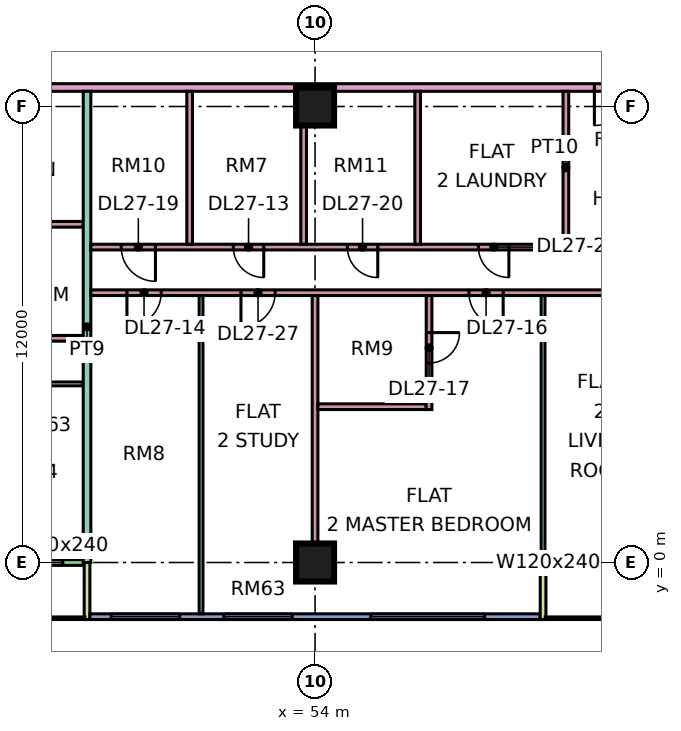
"""IFC4 building model, lengths in metres.
Left out: names, types, materials, properties, quantities, classifications, styles, units other than length and angle.
Written with IfcOpenShell. Run it as: python <this file> out.ifc"""

import sys

from ifc_helpers import new_model, si_unit, direction, frame, frame_2d, origin, origin_2d, place, context, subcontext, project, spatial, rectangle, extrude, element, fill, save


model = new_model("IFC4")
c1 = context("Model", 3, precision=1e-05, world=origin(), true_north=direction((0.0, 1.0)))
c2 = subcontext(c1, "Body", "Model", "MODEL_VIEW")
j1 = project(units=[si_unit("LENGTHUNIT", "METRE"), si_unit("PLANEANGLEUNIT", "RADIAN")], contexts=[c1])
p1 = place(None, origin())
s1 = spatial("IfcSite", under=j1, at=p1, CompositionType="ELEMENT")
p2 = place(p1, origin())
s2 = spatial("IfcBuilding", under=s1, at=p2, CompositionType="ELEMENT")
p3 = place(p2, frame((0.0, 0.0, 118.15)))
s3 = spatial("IfcBuildingStorey", under=s2, at=p3, CompositionType="ELEMENT", Elevation=118.15)
for number, where, z_axis, x_axis in (
    (1, (54.0, 0.0, 0.0), (0.0, 0.0, 1.0), (1.0, 0.0, 0.0)),
    (2, (54.0, 12.0, 0.0), (0.0, 0.0, 1.0), (1.0, 0.0, 0.0)),
):
    element("IfcColumn", number, at=place(p3, frame(where, z_axis=z_axis, x_axis=x_axis)), inside=s3, PredefinedType="COLUMN", context=c2, shape_type="SweptSolid", body=[
        extrude(rectangle(XDim=1.0, YDim=1.0, at=origin_2d()), origin(), (0.0, 0.0, 1.0), 3.75),
    ])
p4 = place(p3, frame((36.075, 0.0, 0.0), z_axis=(0.0, 0.0, 1.0), x_axis=(1.0, 0.0, 0.0)))
e3 = element("IfcWall", 3, at=p4, inside=s3, PredefinedType="SOLIDWALL", context=c2, shape_type="SweptSolid", body=[
    extrude(rectangle(XDim=11.85, YDim=0.15, at=frame_2d((5.925, 0.0))), origin(), (0.0, 0.0, 1.0), 3.35),
])
p5 = place(p4, frame((3.525, 0.0, 0.0)))
e4 = element("IfcOpeningElement", 4, at=p5, cuts=e3, PredefinedType="OPENING", context=c2, shape_type="SweptSolid", body=[
    extrude(rectangle(XDim=1.8, YDim=2.4, at=frame_2d((0.9, 1.2))), frame((0.0, 0.085, 0.0), z_axis=(0.0, -1.0, 0.0), x_axis=(1.0, 0.0, 0.0)), (0.0, 0.0, 1.0), 0.17),
])
p6 = place(p4, frame((10.087, 0.0, 0.45)))
e5 = element("IfcOpeningElement", 5, at=p6, cuts=e3, PredefinedType="OPENING", context=c2, shape_type="SweptSolid", body=[
    extrude(rectangle(XDim=1.2, YDim=2.4, at=frame_2d((0.6, 1.2))), frame((0.0, 0.085, 0.0), z_axis=(0.0, -1.0, 0.0), x_axis=(1.0, 0.0, 0.0)), (0.0, 0.0, 1.0), 0.17),
])
p7 = place(p3, frame((48.0, -1.5, 0.0), z_axis=(0.0, 0.0, 1.0), x_axis=(0.0, 1.0, 0.0)))
e6 = element("IfcWall", 6, at=p7, inside=s3, PredefinedType="SOLIDWALL", context=c2, shape_type="SweptSolid", body=[
    extrude(rectangle(XDim=1.5, YDim=0.15, at=frame_2d((0.75, 0.0))), origin(), (0.0, 0.0, 1.0), 3.35),
])
p8 = place(p3, frame((48.075, -1.425, 0.0), z_axis=(0.0, 0.0, 1.0), x_axis=(1.0, 0.0, 0.0)))
e7 = element("IfcWall", 7, at=p8, inside=s3, PredefinedType="SOLIDWALL", context=c2, shape_type="SweptSolid", body=[
    extrude(rectangle(XDim=11.85, YDim=0.15, at=frame_2d((5.925, 0.0))), origin(), (0.0, 0.0, 1.0), 3.35),
])
p9 = place(p8, frame((0.562, 0.0, 0.45)))
e8 = element("IfcOpeningElement", 8, at=p9, cuts=e7, PredefinedType="OPENING", context=c2, shape_type="SweptSolid", body=[
    extrude(rectangle(XDim=1.8, YDim=2.4, at=frame_2d((0.9, 1.2))), frame((0.0, 0.085, 0.0), z_axis=(0.0, -1.0, 0.0), x_axis=(1.0, 0.0, 0.0)), (0.0, 0.0, 1.0), 0.17),
])
p10 = place(p8, frame((3.525, 0.0, 0.45)))
e9 = element("IfcOpeningElement", 9, at=p10, cuts=e7, PredefinedType="OPENING", context=c2, shape_type="SweptSolid", body=[
    extrude(rectangle(XDim=1.8, YDim=2.4, at=frame_2d((0.9, 1.2))), frame((0.0, 0.085, 0.0), z_axis=(0.0, -1.0, 0.0), x_axis=(1.0, 0.0, 0.0)), (0.0, 0.0, 1.0), 0.17),
])
p11 = place(p8, frame((7.387, 0.0, 0.45)))
e10 = element("IfcOpeningElement", 10, at=p11, cuts=e7, PredefinedType="OPENING", context=c2, shape_type="SweptSolid", body=[
    extrude(rectangle(XDim=3.0, YDim=2.4, at=frame_2d((1.5, 1.2))), frame((0.0, 0.085, 0.0), z_axis=(0.0, -1.0, 0.0), x_axis=(1.0, 0.0, 0.0)), (0.0, 0.0, 1.0), 0.17),
])
p12 = place(p3, frame((60.075, 0.0, 0.0), z_axis=(0.0, 0.0, 1.0), x_axis=(1.0, 0.0, 0.0)))
e11 = element("IfcWall", 11, at=p12, inside=s3, PredefinedType="SOLIDWALL", context=c2, shape_type="SweptSolid", body=[
    extrude(rectangle(XDim=10.35, YDim=0.15, at=frame_2d((5.175, 0.0))), origin(), (0.0, 0.0, 1.0), 3.35),
])
p13 = place(p12, frame((0.562, 0.0, 0.45)))
e12 = element("IfcOpeningElement", 12, at=p13, cuts=e11, PredefinedType="OPENING", context=c2, shape_type="SweptSolid", body=[
    extrude(rectangle(XDim=1.2, YDim=2.4, at=frame_2d((0.6, 1.2))), frame((0.0, 0.085, 0.0), z_axis=(0.0, -1.0, 0.0), x_axis=(1.0, 0.0, 0.0)), (0.0, 0.0, 1.0), 0.17),
])
p14 = place(p12, frame((4.125, 0.0, 0.0)))
e13 = element("IfcOpeningElement", 13, at=p14, cuts=e11, PredefinedType="OPENING", context=c2, shape_type="SweptSolid", body=[
    extrude(rectangle(XDim=1.2, YDim=2.4, at=frame_2d((0.6, 1.2))), frame((0.0, 0.085, 0.0), z_axis=(0.0, -1.0, 0.0), x_axis=(1.0, 0.0, 0.0)), (0.0, 0.0, 1.0), 0.17),
])
p15 = place(p12, frame((6.525, 0.0, 0.45)))
e14 = element("IfcOpeningElement", 14, at=p15, cuts=e11, PredefinedType="OPENING", context=c2, shape_type="SweptSolid", body=[
    extrude(rectangle(XDim=1.8, YDim=2.4, at=frame_2d((0.9, 1.2))), frame((0.0, 0.085, 0.0), z_axis=(0.0, -1.0, 0.0), x_axis=(1.0, 0.0, 0.0)), (0.0, 0.0, 1.0), 0.17),
])
p16 = place(p12, frame((9.188, 0.0, 0.45)))
e15 = element("IfcOpeningElement", 15, at=p16, cuts=e11, PredefinedType="OPENING", context=c2, shape_type="SweptSolid", body=[
    extrude(rectangle(XDim=0.9, YDim=2.4, at=frame_2d((0.45, 1.2))), frame((0.0, 0.085, 0.0), z_axis=(0.0, -1.0, 0.0), x_axis=(1.0, 0.0, 0.0)), (0.0, 0.0, 1.0), 0.17),
])
p17 = place(p3, frame((60.0, -1.5, 0.0), z_axis=(0.0, 0.0, 1.0), x_axis=(0.0, 1.0, 0.0)))
e16 = element("IfcWall", 16, at=p17, inside=s3, PredefinedType="SOLIDWALL", context=c2, shape_type="SweptSolid", body=[
    extrude(rectangle(XDim=1.5, YDim=0.15, at=frame_2d((0.75, 0.0))), origin(), (0.0, 0.0, 1.0), 3.35),
])
p18 = place(p3, frame((33.05, 4.7, 0.0), z_axis=(0.0, 0.0, 1.0), x_axis=(1.0, 0.0, 0.0)))
e17 = element("IfcWall", 17, at=p18, inside=s3, PredefinedType="PARTITIONING", context=c2, shape_type="SweptSolid", body=[
    extrude(rectangle(XDim=14.85, YDim=0.1, at=frame_2d((7.425, 0.0))), origin(), (0.0, 0.0, 1.0), 3.35),
])
p19 = place(p18, frame((1.0, 0.0, 0.0)))
e18 = element("IfcOpeningElement", 18, at=p19, cuts=e17, PredefinedType="OPENING", context=c2, shape_type="SweptSolid", body=[
    extrude(rectangle(XDim=0.9, YDim=2.1, at=frame_2d((0.45, 1.05))), frame((0.0, 0.06, 0.0), z_axis=(0.0, -1.0, 0.0), x_axis=(1.0, 0.0, 0.0)), (0.0, 0.0, 1.0), 0.12),
])
p20 = place(p18, frame((13.0, 0.0, 0.0)))
e19 = element("IfcOpeningElement", 19, at=p20, cuts=e17, PredefinedType="OPENING", context=c2, shape_type="SweptSolid", body=[
    extrude(rectangle(XDim=0.9, YDim=2.1, at=frame_2d((0.45, 1.05))), frame((0.0, 0.06, 0.0), z_axis=(0.0, -1.0, 0.0), x_axis=(1.0, 0.0, 0.0)), (0.0, 0.0, 1.0), 0.12),
])
p21 = place(p18, frame((7.0, 0.0, 0.0)))
e20 = element("IfcOpeningElement", 20, at=p21, cuts=e17, PredefinedType="OPENING", context=c2, shape_type="SweptSolid", body=[
    extrude(rectangle(XDim=0.9, YDim=2.1, at=frame_2d((0.45, 1.05))), frame((0.0, 0.06, 0.0), z_axis=(0.0, -1.0, 0.0), x_axis=(1.0, 0.0, 0.0)), (0.0, 0.0, 1.0), 0.12),
])
p22 = place(p3, frame((40.65, 12.5, 0.0), z_axis=(0.0, 0.0, 1.0), x_axis=(1.0, 0.0, 0.0)))
e21 = element("IfcWall", 21, at=p22, inside=s3, PredefinedType="PARTITIONING", context=c2, shape_type="SweptSolid", body=[
    extrude(rectangle(XDim=31.276, YDim=0.2, at=frame_2d((15.638, 0.0))), origin(), (0.0, 0.0, 1.0), 3.35),
])
p23 = place(p22, frame((20.7, 0.0, 0.0)))
e22 = element("IfcOpeningElement", 22, at=p23, cuts=e21, PredefinedType="OPENING", context=c2, shape_type="SweptSolid", body=[
    extrude(rectangle(XDim=1.0, YDim=2.1, at=frame_2d((0.5, 1.05))), frame((0.0, 0.11, 0.0), z_axis=(0.0, -1.0, 0.0), x_axis=(1.0, 0.0, 0.0)), (0.0, 0.0, 1.0), 0.22),
])
p24 = place(p22, frame((1.05, 0.0, 0.0)))
e23 = element("IfcOpeningElement", 23, at=p24, cuts=e21, PredefinedType="OPENING", context=c2, shape_type="SweptSolid", body=[
    extrude(rectangle(XDim=1.0, YDim=2.1, at=frame_2d((0.5, 1.05))), frame((0.0, 0.11, 0.0), z_axis=(0.0, -1.0, 0.0), x_axis=(1.0, 0.0, 0.0)), (0.0, 0.0, 1.0), 0.22),
])
p25 = place(p3, frame((43.725, 5.9, 0.0), z_axis=(0.0, 0.0, 1.0), x_axis=(1.0, 0.0, 0.0)))
e24 = element("IfcWall", 24, at=p25, inside=s3, PredefinedType="PARTITIONING", context=c2, shape_type="SweptSolid", body=[
    extrude(rectangle(XDim=4.175, YDim=0.15, at=frame_2d((2.087, 0.0))), origin(), (0.0, 0.0, 1.0), 3.35),
])
p26 = place(p25, frame((1.675, 0.0, 0.0)))
e25 = element("IfcOpeningElement", 25, at=p26, cuts=e24, PredefinedType="OPENING", context=c2, shape_type="SweptSolid", body=[
    extrude(rectangle(XDim=0.8, YDim=2.1, at=frame_2d((0.4, 1.05))), frame((0.0, 0.085, 0.0), z_axis=(0.0, -1.0, 0.0), x_axis=(1.0, 0.0, 0.0)), (0.0, 0.0, 1.0), 0.17),
])
p27 = place(p3, frame((43.725, 8.9, 0.0), z_axis=(0.0, 0.0, 1.0), x_axis=(1.0, 0.0, 0.0)))
e26 = element("IfcWall", 26, at=p27, inside=s3, PredefinedType="PARTITIONING", context=c2, shape_type="SweptSolid", body=[
    extrude(rectangle(XDim=4.175, YDim=0.15, at=frame_2d((2.087, 0.0))), origin(), (0.0, 0.0, 1.0), 3.35),
])
p28 = place(p3, frame((48.0, 0.0, 0.0), z_axis=(0.0, 0.0, 1.0), x_axis=(0.0, 1.0, 0.0)))
e27 = element("IfcWall", 27, at=p28, inside=s3, PredefinedType="PARTITIONING", context=c2, shape_type="SweptSolid", body=[
    extrude(rectangle(XDim=12.4, YDim=0.2, at=frame_2d((6.2, 0.0))), origin(), (0.0, 0.0, 1.0), 3.35),
])
p29 = place(p3, frame((48.1, 7.1, 0.0), z_axis=(0.0, 0.0, 1.0), x_axis=(1.0, 0.0, 0.0)))
e28 = element("IfcWall", 28, at=p29, inside=s3, PredefinedType="PARTITIONING", context=c2, shape_type="SweptSolid", body=[
    extrude(rectangle(XDim=25.25, YDim=0.15, at=frame_2d((12.625, 0.0))), origin(), (0.0, 0.0, 1.0), 3.35),
])
p30 = place(p29, frame((0.95, 0.0, 0.0)))
e29 = element("IfcOpeningElement", 29, at=p30, cuts=e28, PredefinedType="OPENING", context=c2, shape_type="SweptSolid", body=[
    extrude(rectangle(XDim=0.9, YDim=2.1, at=frame_2d((0.45, 1.05))), frame((0.0, 0.085, 0.0), z_axis=(0.0, -1.0, 0.0), x_axis=(1.0, 0.0, 0.0)), (0.0, 0.0, 1.0), 0.17),
])
p31 = place(p29, frame((21.95, 0.0, 0.0)))
e30 = element("IfcOpeningElement", 30, at=p31, cuts=e28, PredefinedType="OPENING", context=c2, shape_type="SweptSolid", body=[
    extrude(rectangle(XDim=0.9, YDim=2.1, at=frame_2d((0.45, 1.05))), frame((0.0, 0.085, 0.0), z_axis=(0.0, -1.0, 0.0), x_axis=(1.0, 0.0, 0.0)), (0.0, 0.0, 1.0), 0.17),
])
p32 = place(p29, frame((9.95, 0.0, 0.0)))
e31 = element("IfcOpeningElement", 31, at=p32, cuts=e28, PredefinedType="OPENING", context=c2, shape_type="SweptSolid", body=[
    extrude(rectangle(XDim=0.9, YDim=2.1, at=frame_2d((0.45, 1.05))), frame((0.0, 0.085, 0.0), z_axis=(0.0, -1.0, 0.0), x_axis=(1.0, 0.0, 0.0)), (0.0, 0.0, 1.0), 0.17),
])
p33 = place(p29, frame((14.45, 0.0, 0.0)))
e32 = element("IfcOpeningElement", 32, at=p33, cuts=e28, PredefinedType="OPENING", context=c2, shape_type="SweptSolid", body=[
    extrude(rectangle(XDim=0.9, YDim=2.1, at=frame_2d((0.45, 1.05))), frame((0.0, 0.085, 0.0), z_axis=(0.0, -1.0, 0.0), x_axis=(1.0, 0.0, 0.0)), (0.0, 0.0, 1.0), 0.17),
])
p34 = place(p29, frame((19.8, 0.0, 0.0)))
e33 = element("IfcOpeningElement", 33, at=p34, cuts=e28, PredefinedType="OPENING", context=c2, shape_type="SweptSolid", body=[
    extrude(rectangle(XDim=0.8, YDim=2.1, at=frame_2d((0.4, 1.05))), frame((0.0, 0.085, 0.0), z_axis=(0.0, -1.0, 0.0), x_axis=(1.0, 0.0, 0.0)), (0.0, 0.0, 1.0), 0.17),
])
p35 = place(p29, frame((3.95, 0.0, 0.0)))
e34 = element("IfcOpeningElement", 34, at=p35, cuts=e28, PredefinedType="OPENING", context=c2, shape_type="SweptSolid", body=[
    extrude(rectangle(XDim=0.9, YDim=2.1, at=frame_2d((0.45, 1.05))), frame((0.0, 0.085, 0.0), z_axis=(0.0, -1.0, 0.0), x_axis=(1.0, 0.0, 0.0)), (0.0, 0.0, 1.0), 0.17),
])
p36 = place(p3, frame((48.1, 8.3, 0.0), z_axis=(0.0, 0.0, 1.0), x_axis=(1.0, 0.0, 0.0)))
e35 = element("IfcWall", 35, at=p36, inside=s3, PredefinedType="PARTITIONING", context=c2, shape_type="SweptSolid", body=[
    extrude(rectangle(XDim=12.575, YDim=0.15, at=frame_2d((6.288, 0.0))), origin(), (0.0, 0.0, 1.0), 3.35),
])
p37 = place(p36, frame((3.75, 0.0, 0.0)))
e36 = element("IfcOpeningElement", 36, at=p37, cuts=e35, PredefinedType="OPENING", context=c2, shape_type="SweptSolid", body=[
    extrude(rectangle(XDim=0.8, YDim=2.1, at=frame_2d((0.4, 1.05))), frame((0.0, 0.085, 0.0), z_axis=(0.0, -1.0, 0.0), x_axis=(1.0, 0.0, 0.0)), (0.0, 0.0, 1.0), 0.17),
])
p38 = place(p36, frame((0.8, 0.0, 0.0)))
e37 = element("IfcOpeningElement", 37, at=p38, cuts=e35, PredefinedType="OPENING", context=c2, shape_type="SweptSolid", body=[
    extrude(rectangle(XDim=0.9, YDim=2.1, at=frame_2d((0.45, 1.05))), frame((0.0, 0.085, 0.0), z_axis=(0.0, -1.0, 0.0), x_axis=(1.0, 0.0, 0.0)), (0.0, 0.0, 1.0), 0.17),
])
p39 = place(p36, frame((6.75, 0.0, 0.0)))
e38 = element("IfcOpeningElement", 38, at=p39, cuts=e35, PredefinedType="OPENING", context=c2, shape_type="SweptSolid", body=[
    extrude(rectangle(XDim=0.8, YDim=2.1, at=frame_2d((0.4, 1.05))), frame((0.0, 0.085, 0.0), z_axis=(0.0, -1.0, 0.0), x_axis=(1.0, 0.0, 0.0)), (0.0, 0.0, 1.0), 0.17),
])
p40 = place(p36, frame((10.2, 0.0, 0.0)))
e39 = element("IfcOpeningElement", 39, at=p40, cuts=e35, PredefinedType="OPENING", context=c2, shape_type="SweptSolid", body=[
    extrude(rectangle(XDim=0.8, YDim=2.1, at=frame_2d((0.4, 1.05))), frame((0.0, 0.085, 0.0), z_axis=(0.0, -1.0, 0.0), x_axis=(1.0, 0.0, 0.0)), (0.0, 0.0, 1.0), 0.17),
])
p41 = place(p3, frame((50.7, 8.375, 0.0), z_axis=(0.0, 0.0, 1.0), x_axis=(0.0, 1.0, 0.0)))
e40 = element("IfcWall", 40, at=p41, inside=s3, PredefinedType="PARTITIONING", context=c2, shape_type="SweptSolid", body=[
    extrude(rectangle(XDim=4.025, YDim=0.15, at=frame_2d((2.012, 0.0))), origin(), (0.0, 0.0, 1.0), 3.35),
])
p42 = place(p3, frame((51.0, -1.35, 0.0), z_axis=(0.0, 0.0, 1.0), x_axis=(0.0, 1.0, 0.0)))
e41 = element("IfcWall", 41, at=p42, inside=s3, PredefinedType="PARTITIONING", context=c2, shape_type="SweptSolid", body=[
    extrude(rectangle(XDim=8.375, YDim=0.1, at=frame_2d((4.188, 0.0))), origin(), (0.0, 0.0, 1.0), 3.35),
])
p43 = place(p3, frame((53.7, 8.375, 0.0), z_axis=(0.0, 0.0, 1.0), x_axis=(0.0, 1.0, 0.0)))
e42 = element("IfcWall", 42, at=p43, inside=s3, PredefinedType="PARTITIONING", context=c2, shape_type="SweptSolid", body=[
    extrude(rectangle(XDim=4.025, YDim=0.15, at=frame_2d((2.012, 0.0))), origin(), (0.0, 0.0, 1.0), 3.35),
])
p44 = place(p3, frame((54.0, 0.0, 0.0), z_axis=(0.0, 0.0, 1.0), x_axis=(0.0, 1.0, 0.0)))
e43 = element("IfcWall", 43, at=p44, inside=s3, PredefinedType="PARTITIONING", context=c2, shape_type="SweptSolid", body=[
    extrude(rectangle(XDim=7.025, YDim=0.15, at=frame_2d((3.512, 0.0))), origin(), (0.0, 0.0, 1.0), 3.35),
])
p45 = place(p3, frame((54.075, 4.1, 0.0), z_axis=(0.0, 0.0, 1.0), x_axis=(1.0, 0.0, 0.0)))
e44 = element("IfcWall", 44, at=p45, inside=s3, PredefinedType="PARTITIONING", context=c2, shape_type="SweptSolid", body=[
    extrude(rectangle(XDim=2.85, YDim=0.15, at=frame_2d((1.425, 0.0))), origin(), (0.0, 0.0, 1.0), 3.35),
])
p46 = place(p3, frame((56.7, 8.375, 0.0), z_axis=(0.0, 0.0, 1.0), x_axis=(0.0, 1.0, 0.0)))
e45 = element("IfcWall", 45, at=p46, inside=s3, PredefinedType="PARTITIONING", context=c2, shape_type="SweptSolid", body=[
    extrude(rectangle(XDim=4.025, YDim=0.15, at=frame_2d((2.012, 0.0))), origin(), (0.0, 0.0, 1.0), 3.35),
])
p47 = place(p3, frame((57.0, 4.025, 0.0), z_axis=(0.0, 0.0, 1.0), x_axis=(0.0, 1.0, 0.0)))
e46 = element("IfcWall", 46, at=p47, inside=s3, PredefinedType="PARTITIONING", context=c2, shape_type="SweptSolid", body=[
    extrude(rectangle(XDim=3.0, YDim=0.15, at=frame_2d((1.5, 0.0))), origin(), (0.0, 0.0, 1.0), 3.35),
])
p48 = place(p47, frame((1.225, 0.0, 0.0)))
e47 = element("IfcOpeningElement", 47, at=p48, cuts=e46, PredefinedType="OPENING", context=c2, shape_type="SweptSolid", body=[
    extrude(rectangle(XDim=0.8, YDim=2.1, at=frame_2d((0.4, 1.05))), frame((0.0, 0.085, 0.0), z_axis=(0.0, -1.0, 0.0), x_axis=(1.0, 0.0, 0.0)), (0.0, 0.0, 1.0), 0.17),
])
p49 = place(p3, frame((60.0, 0.0, 0.0), z_axis=(0.0, 0.0, 1.0), x_axis=(0.0, 1.0, 0.0)))
e48 = element("IfcWall", 48, at=p49, inside=s3, PredefinedType="PARTITIONING", context=c2, shape_type="SweptSolid", body=[
    extrude(rectangle(XDim=7.025, YDim=0.1, at=frame_2d((3.512, 0.0))), origin(), (0.0, 0.0, 1.0), 3.35),
])
p50 = place(p3, frame((60.6, 8.375, 0.0), z_axis=(0.0, 0.0, 1.0), x_axis=(0.0, 1.0, 0.0)))
e49 = element("IfcWall", 49, at=p50, inside=s3, PredefinedType="PARTITIONING", context=c2, shape_type="SweptSolid", body=[
    extrude(rectangle(XDim=4.025, YDim=0.15, at=frame_2d((2.012, 0.0))), origin(), (0.0, 0.0, 1.0), 3.35),
])
p51 = place(p6, origin())
e50 = element("IfcWindow", 50, at=p51, inside=s3, PartitioningType="SINGLE_PANEL", PredefinedType="WINDOW", context=c2, shape_type="SweptSolid", body=[
    extrude(rectangle(XDim=1.2, YDim=2.4, at=frame_2d((0.6, 1.2))), frame((0.0, 0.03, 0.0), z_axis=(0.0, -1.0, 0.0), x_axis=(1.0, 0.0, 0.0)), (0.0, 0.0, 1.0), 0.06),
])
fill(e5, e50)
p52 = place(p9, origin())
e51 = element("IfcWindow", 51, at=p52, inside=s3, PartitioningType="SINGLE_PANEL", PredefinedType="WINDOW", context=c2, shape_type="SweptSolid", body=[
    extrude(rectangle(XDim=1.8, YDim=2.4, at=frame_2d((0.9, 1.2))), frame((0.0, 0.03, 0.0), z_axis=(0.0, -1.0, 0.0), x_axis=(1.0, 0.0, 0.0)), (0.0, 0.0, 1.0), 0.06),
])
fill(e8, e51)
p53 = place(p10, origin())
e52 = element("IfcWindow", 52, at=p53, inside=s3, PartitioningType="SINGLE_PANEL", PredefinedType="WINDOW", context=c2, shape_type="SweptSolid", body=[
    extrude(rectangle(XDim=1.8, YDim=2.4, at=frame_2d((0.9, 1.2))), frame((0.0, 0.03, 0.0), z_axis=(0.0, -1.0, 0.0), x_axis=(1.0, 0.0, 0.0)), (0.0, 0.0, 1.0), 0.06),
])
fill(e9, e52)
p54 = place(p11, origin())
e53 = element("IfcWindow", 53, at=p54, inside=s3, PartitioningType="SINGLE_PANEL", PredefinedType="WINDOW", context=c2, shape_type="SweptSolid", body=[
    extrude(rectangle(XDim=3.0, YDim=2.4, at=frame_2d((1.5, 1.2))), frame((0.0, 0.03, 0.0), z_axis=(0.0, -1.0, 0.0), x_axis=(1.0, 0.0, 0.0)), (0.0, 0.0, 1.0), 0.06),
])
fill(e10, e53)
p55 = place(p13, origin())
e54 = element("IfcWindow", 54, at=p55, inside=s3, PartitioningType="SINGLE_PANEL", PredefinedType="WINDOW", context=c2, shape_type="SweptSolid", body=[
    extrude(rectangle(XDim=1.2, YDim=2.4, at=frame_2d((0.6, 1.2))), frame((0.0, 0.03, 0.0), z_axis=(0.0, -1.0, 0.0), x_axis=(1.0, 0.0, 0.0)), (0.0, 0.0, 1.0), 0.06),
])
fill(e12, e54)
p56 = place(p37, origin())
e55 = element("IfcDoor", 55, at=p56, inside=s3, OperationType="SINGLE_SWING_RIGHT", PredefinedType="DOOR", context=c2, shape_type="SweptSolid", body=[
    extrude(rectangle(XDim=0.8, YDim=2.1, at=frame_2d((0.4, 1.05))), frame((0.0, 0.025, 0.0), z_axis=(0.0, -1.0, 0.0), x_axis=(1.0, 0.0, 0.0)), (0.0, 0.0, 1.0), 0.05),
])
fill(e36, e55)
p57 = place(p30, frame((0.9, 0.0, 0.0), z_axis=(0.0, 0.0, 1.0), x_axis=(-1.0, 0.0, 0.0)))
e56 = element("IfcDoor", 56, at=p57, inside=s3, OperationType="SINGLE_SWING_LEFT", PredefinedType="DOOR", context=c2, shape_type="SweptSolid", body=[
    extrude(rectangle(XDim=0.9, YDim=2.1, at=frame_2d((0.45, 1.05))), frame((0.0, 0.025, 0.0), z_axis=(0.0, -1.0, 0.0), x_axis=(1.0, 0.0, 0.0)), (0.0, 0.0, 1.0), 0.05),
])
fill(e29, e56)
p58 = place(p32, origin())
e57 = element("IfcDoor", 57, at=p58, inside=s3, OperationType="SINGLE_SWING_RIGHT", PredefinedType="DOOR", context=c2, shape_type="SweptSolid", body=[
    extrude(rectangle(XDim=0.9, YDim=2.1, at=frame_2d((0.45, 1.05))), frame((0.0, 0.025, 0.0), z_axis=(0.0, -1.0, 0.0), x_axis=(1.0, 0.0, 0.0)), (0.0, 0.0, 1.0), 0.05),
])
fill(e31, e57)
p59 = place(p48, origin())
e58 = element("IfcDoor", 58, at=p59, inside=s3, OperationType="SINGLE_SWING_RIGHT", PredefinedType="DOOR", context=c2, shape_type="SweptSolid", body=[
    extrude(rectangle(XDim=0.8, YDim=2.1, at=frame_2d((0.4, 1.05))), frame((0.0, 0.025, 0.0), z_axis=(0.0, -1.0, 0.0), x_axis=(1.0, 0.0, 0.0)), (0.0, 0.0, 1.0), 0.05),
])
fill(e47, e58)
p60 = place(p23, frame((1.0, 0.0, 0.0), z_axis=(0.0, 0.0, 1.0), x_axis=(-1.0, 0.0, 0.0)))
e59 = element("IfcDoor", 59, at=p60, inside=s3, OperationType="SINGLE_SWING_LEFT", PredefinedType="DOOR", context=c2, shape_type="SweptSolid", body=[
    extrude(rectangle(XDim=1.0, YDim=2.1, at=frame_2d((0.5, 1.05))), frame((0.0, 0.025, 0.0), z_axis=(0.0, -1.0, 0.0), x_axis=(1.0, 0.0, 0.0)), (0.0, 0.0, 1.0), 0.05),
])
fill(e22, e59)
p61 = place(p38, origin())
e60 = element("IfcDoor", 60, at=p61, inside=s3, OperationType="SINGLE_SWING_RIGHT", PredefinedType="DOOR", context=c2, shape_type="SweptSolid", body=[
    extrude(rectangle(XDim=0.9, YDim=2.1, at=frame_2d((0.45, 1.05))), frame((0.0, 0.025, 0.0), z_axis=(0.0, -1.0, 0.0), x_axis=(1.0, 0.0, 0.0)), (0.0, 0.0, 1.0), 0.05),
])
fill(e37, e60)
p62 = place(p39, origin())
e61 = element("IfcDoor", 61, at=p62, inside=s3, OperationType="SINGLE_SWING_RIGHT", PredefinedType="DOOR", context=c2, shape_type="SweptSolid", body=[
    extrude(rectangle(XDim=0.8, YDim=2.1, at=frame_2d((0.4, 1.05))), frame((0.0, 0.025, 0.0), z_axis=(0.0, -1.0, 0.0), x_axis=(1.0, 0.0, 0.0)), (0.0, 0.0, 1.0), 0.05),
])
fill(e38, e61)
p63 = place(p40, origin())
e62 = element("IfcDoor", 62, at=p63, inside=s3, OperationType="SINGLE_SWING_RIGHT", PredefinedType="DOOR", context=c2, shape_type="SweptSolid", body=[
    extrude(rectangle(XDim=0.8, YDim=2.1, at=frame_2d((0.4, 1.05))), frame((0.0, 0.025, 0.0), z_axis=(0.0, -1.0, 0.0), x_axis=(1.0, 0.0, 0.0)), (0.0, 0.0, 1.0), 0.05),
])
fill(e39, e62)
p64 = place(p35, frame((0.9, 0.0, 0.0), z_axis=(0.0, 0.0, 1.0), x_axis=(-1.0, 0.0, 0.0)))
e63 = element("IfcDoor", 63, at=p64, inside=s3, OperationType="SINGLE_SWING_LEFT", PredefinedType="DOOR", context=c2, shape_type="SweptSolid", body=[
    extrude(rectangle(XDim=0.9, YDim=2.1, at=frame_2d((0.45, 1.05))), frame((0.0, 0.025, 0.0), z_axis=(0.0, -1.0, 0.0), x_axis=(1.0, 0.0, 0.0)), (0.0, 0.0, 1.0), 0.05),
])
fill(e34, e63)
save(model, sys.argv[1])
